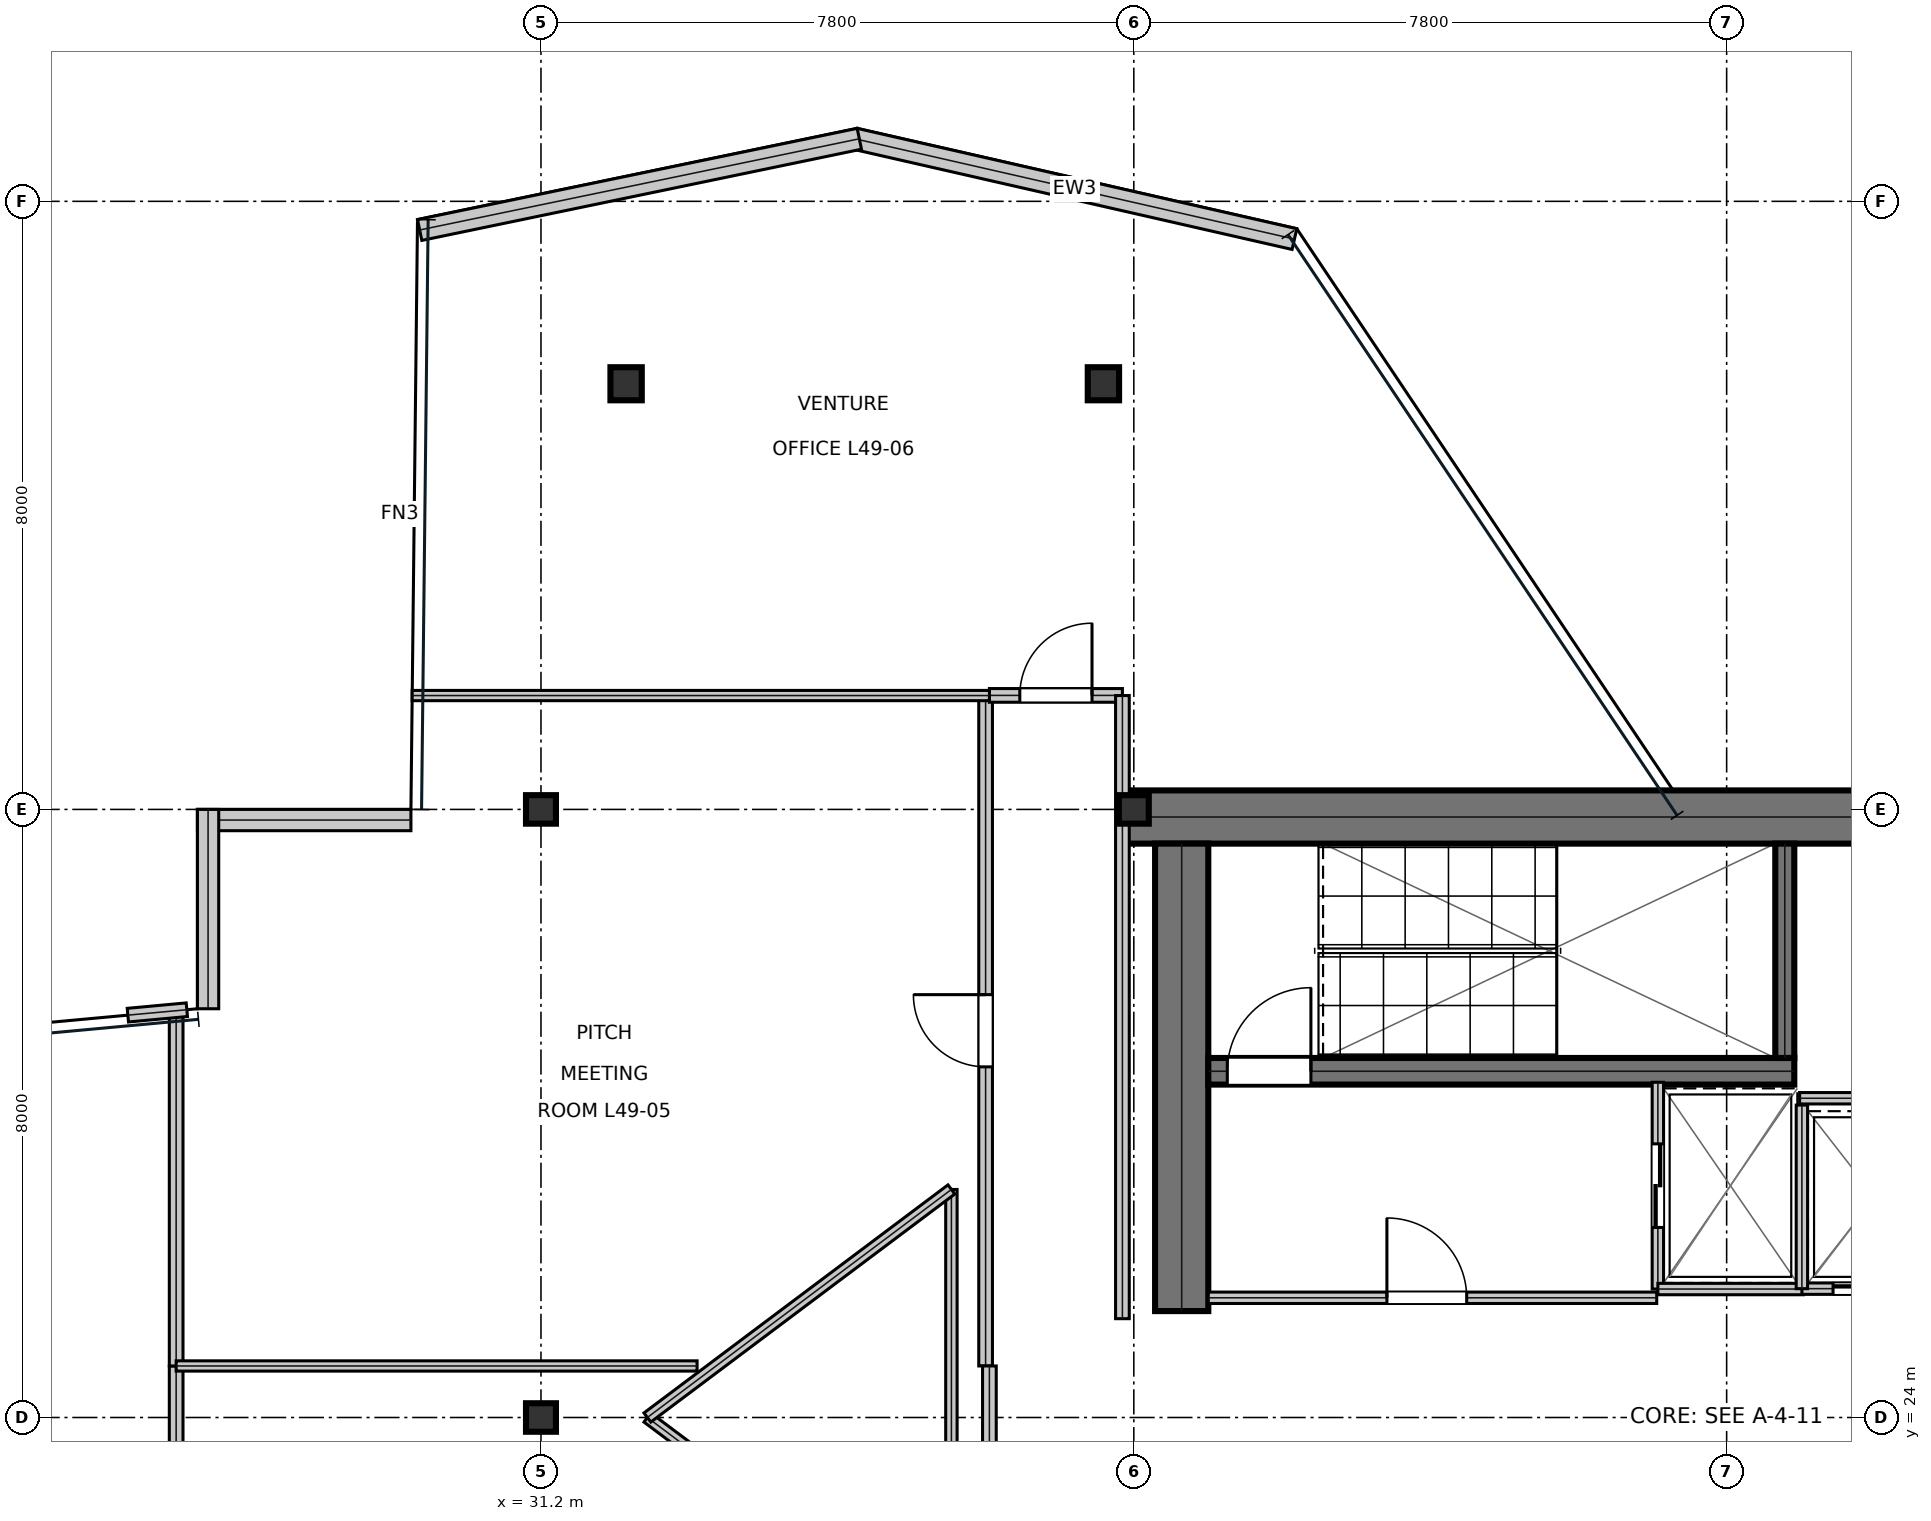
"""IFC4 building model, lengths in metres.
Left out: names, types, materials, properties, quantities, classifications, styles, units other than length and angle.
Written with IfcOpenShell. Run it as: python <this file> out.ifc"""

import sys

from ifc_helpers import new_model, si_unit, direction, frame, frame_2d, origin, origin_2d, place, context, subcontext, project, spatial, rectangle, i_section, extrude, element, fill, save


model = new_model("IFC4")
c1 = context("Model", 3, precision=1e-05, world=origin(), true_north=direction((0.0, 1.0)))
c2 = subcontext(c1, "Body", "Model", "MODEL_VIEW")
j1 = project(units=[si_unit("LENGTHUNIT", "METRE"), si_unit("PLANEANGLEUNIT", "RADIAN")], contexts=[c1])
p1 = place(None, origin())
s1 = spatial("IfcSite", under=j1, at=p1, CompositionType="ELEMENT")
p2 = place(p1, origin())
s2 = spatial("IfcBuilding", under=s1, at=p2, CompositionType="ELEMENT")
p3 = place(p2, frame((0.0, 0.0, 212.1)))
s3 = spatial("IfcBuildingStorey", under=s2, at=p3, CompositionType="ELEMENT", Elevation=212.1)
p4 = place(p3, frame((38.8, 31.9, 0.0), z_axis=(0.0, 0.0, 1.0), x_axis=(1.0, 0.0, 0.0)))
e1 = element("IfcWall", 1, at=p4, inside=s3, PredefinedType="SHEAR", context=c2, shape_type="SweptSolid", body=[
    extrude(rectangle(XDim=16.0, YDim=0.7, at=frame_2d((8.0, 0.0))), origin(), (0.0, 0.0, 1.0), 3.79),
])
p5 = place(p3, frame((39.63, 25.4, 0.0), z_axis=(0.0, 0.0, 1.0), x_axis=(0.0, 1.0, 0.0)))
e2 = element("IfcWall", 2, at=p5, inside=s3, PredefinedType="SHEAR", context=c2, shape_type="SweptSolid", body=[
    extrude(rectangle(XDim=6.15, YDim=0.7, at=frame_2d((3.075, 0.0))), origin(), (0.0, 0.0, 1.0), 3.79),
])
p6 = place(p3, frame((39.98, 28.555, 0.0), z_axis=(0.0, 0.0, 1.0), x_axis=(1.0, 0.0, 0.0)))
e3 = element("IfcWall", 3, at=p6, inside=s3, PredefinedType="SHEAR", context=c2, shape_type="SweptSolid", body=[
    extrude(rectangle(XDim=7.71, YDim=0.35, at=frame_2d((3.855, 0.0))), origin(), (0.0, 0.0, 1.0), 3.79),
])
p7 = place(p6, frame((0.25, 0.0, 0.0)))
e4 = element("IfcOpeningElement", 4, at=p7, cuts=e3, PredefinedType="OPENING", context=c2, shape_type="SweptSolid", body=[
    extrude(rectangle(XDim=1.1, YDim=2.15, at=frame_2d((0.55, 1.075))), frame((0.0, 0.185, 0.0), z_axis=(0.0, -1.0, 0.0), x_axis=(1.0, 0.0, 0.0)), (0.0, 0.0, 1.0), 0.37),
])
p8 = place(p3, frame((47.565, 28.73, 0.0), z_axis=(0.0, 0.0, 1.0), x_axis=(0.0, 1.0, 0.0)))
e5 = element("IfcWall", 5, at=p8, inside=s3, PredefinedType="SHEAR", context=c2, shape_type="SweptSolid", body=[
    extrude(rectangle(XDim=2.82, YDim=0.25, at=frame_2d((1.41, 0.0))), origin(), (0.0, 0.0, 1.0), 3.79),
])
for number, where, z_axis, x_axis in (
    (6, (31.2, 24.0, 0.0), (0.0, 0.0, 1.0), (1.0, 0.0, 0.0)),
    (7, (31.2, 32.0, 0.0), (0.0, 0.0, 1.0), (1.0, 0.0, 0.0)),
    (8, (39.0, 32.0, 0.0), (0.0, 0.0, 1.0), (1.0, 0.0, 0.0)),
):
    element("IfcColumn", number, at=place(p3, frame(where, z_axis=z_axis, x_axis=x_axis)), inside=s3, PredefinedType="COLUMN", context=c2, shape_type="SweptSolid", body=[
        extrude(i_section(OverallWidth=0.394, OverallDepth=0.375, WebThickness=0.017, FlangeThickness=0.028, at=origin_2d()), origin(), (0.0, 0.0, 1.0), 4.044),
    ])
p9 = place(p3, frame((32.32, 37.6, 0.016), z_axis=(0.017362829439, -0.037336154213, 0.999151912245), x_axis=(0.906747333095, 0.421674369537, 0.0)))
e9 = element("IfcColumn", 9, at=p9, inside=s3, PredefinedType="COLUMN", context=c2, shape_type="SweptSolid", body=[
    extrude(i_section(OverallWidth=0.412, OverallDepth=0.435, WebThickness=0.036, FlangeThickness=0.058, at=origin_2d()), origin(), (0.0, 0.0, 1.0), 4.021),
])
p10 = place(p3, frame((38.6, 37.6, 0.016), z_axis=(-0.006253867425, -0.037341053069, 0.999283010412), x_axis=(0.986263587143, -0.165179104839, 0.0)))
e10 = element("IfcColumn", 10, at=p10, inside=s3, PredefinedType="COLUMN", context=c2, shape_type="SweptSolid", body=[
    extrude(i_section(OverallWidth=0.412, OverallDepth=0.435, WebThickness=0.036, FlangeThickness=0.058, at=origin_2d()), origin(), (0.0, 0.0, 1.0), 4.021),
])
p11 = place(p3, frame((41.113, 39.503, 0.0), z_axis=(0.0, 0.0, 1.0), x_axis=(-0.974934808954, 0.222490715064, 0.0)))
e11 = element("IfcWall", 11, at=p11, inside=s3, PredefinedType="STANDARD", context=c2, shape_type="SweptSolid", body=[
    extrude(rectangle(XDim=5.933, YDim=0.28, at=frame_2d((2.967, 0.0))), origin(), (0.0, 0.0, 1.0), 3.79),
])
p12 = place(p3, frame((35.388, 40.823, 0.0), z_axis=(0.0, 0.0, 1.0), x_axis=(-0.979145472124, -0.203160390873, 0.0)))
e12 = element("IfcWall", 12, at=p12, inside=s3, PredefinedType="STANDARD", context=c2, shape_type="SweptSolid", body=[
    extrude(rectangle(XDim=5.908, YDim=0.28, at=frame_2d((2.954, 0.0))), origin(), (0.0, 0.0, 1.0), 3.79),
])
p13 = place(p3, frame((29.489, 31.86, 0.0), z_axis=(0.0, 0.0, 1.0), x_axis=(-1.0, 0.0, 0.0)))
e13 = element("IfcWall", 13, at=p13, inside=s3, PredefinedType="STANDARD", context=c2, shape_type="SweptSolid", body=[
    extrude(rectangle(XDim=2.809, YDim=0.28, at=frame_2d((1.405, 0.0))), origin(), (0.0, 0.0, 1.0), 3.79),
])
p14 = place(p3, frame((26.82, 32.0, 0.0), z_axis=(0.0, 0.0, 1.0), x_axis=(0.0, -1.0, 0.0)))
e14 = element("IfcWall", 14, at=p14, inside=s3, PredefinedType="STANDARD", context=c2, shape_type="SweptSolid", body=[
    extrude(rectangle(XDim=2.622, YDim=0.28, at=frame_2d((1.311, 0.0))), origin(), (0.0, 0.0, 1.0), 3.319),
])
p15 = place(p3, frame((39.98, 25.575, 0.0), z_axis=(0.0, 0.0, 1.0), x_axis=(1.0, 0.0, 0.0)))
e15 = element("IfcWall", 15, at=p15, inside=s3, PredefinedType="PARTITIONING", context=c2, shape_type="SweptSolid", body=[
    extrude(rectangle(XDim=5.9, YDim=0.15, at=frame_2d((2.95, 0.0))), origin(), (0.0, 0.0, 1.0), 3.79),
])
p16 = place(p15, frame((2.35, 0.0, 0.0)))
e16 = element("IfcOpeningElement", 16, at=p16, cuts=e15, PredefinedType="OPENING", context=c2, shape_type="SweptSolid", body=[
    extrude(rectangle(XDim=1.05, YDim=2.15, at=frame_2d((0.525, 1.075))), frame((0.0, 0.085, 0.0), z_axis=(0.0, -1.0, 0.0), x_axis=(1.0, 0.0, 0.0)), (0.0, 0.0, 1.0), 0.17),
])
p17 = place(p3, frame((45.895, 25.69, 0.0), z_axis=(0.0, 0.0, 1.0), x_axis=(0.0, 1.0, 0.0)))
e17 = element("IfcWall", 17, at=p17, inside=s3, PredefinedType="PARTITIONING", context=c2, shape_type="SweptSolid", body=[
    extrude(rectangle(XDim=2.72, YDim=0.15, at=frame_2d((1.36, 0.0))), origin(), (0.0, 0.0, 1.0), 3.79),
])
p18 = place(p17, frame((0.81, 0.0, 0.0)))
e18 = element("IfcOpeningElement", 18, at=p18, cuts=e17, PredefinedType="OPENING", context=c2, shape_type="SweptSolid", body=[
    extrude(rectangle(XDim=1.1, YDim=2.15, at=frame_2d((0.55, 1.075))), frame((0.0, 0.085, 0.0), z_axis=(0.0, -1.0, 0.0), x_axis=(1.0, 0.0, 0.0)), (0.0, 0.0, 1.0), 0.17),
])
p19 = place(p3, frame((45.895, 25.69, 0.0), z_axis=(0.0, 0.0, 1.0), x_axis=(1.0, 0.0, 0.0)))
e19 = element("IfcWall", 19, at=p19, inside=s3, PredefinedType="PARTITIONING", context=c2, shape_type="SweptSolid", body=[
    extrude(rectangle(XDim=1.915, YDim=0.15, at=frame_2d((0.958, 0.0))), origin(), (0.0, 0.0, 1.0), 3.79),
])
p20 = place(p3, frame((47.79, 25.695, 0.0), z_axis=(0.0, 0.0, 1.0), x_axis=(1.0, 0.0, 0.0)))
e20 = element("IfcWall", 20, at=p20, inside=s3, PredefinedType="PARTITIONING", context=c2, shape_type="SweptSolid", body=[
    extrude(rectangle(XDim=1.92, YDim=0.15, at=frame_2d((0.96, 0.0))), origin(), (0.0, 0.0, 1.0), 3.79),
])
p21 = place(p20, frame((0.41, 0.0, 0.0)))
e21 = element("IfcOpeningElement", 21, at=p21, cuts=e20, PredefinedType="OPENING", context=c2, shape_type="SweptSolid", body=[
    extrude(rectangle(XDim=1.1, YDim=2.15, at=frame_2d((0.55, 1.075))), frame((0.0, 0.085, 0.0), z_axis=(0.0, -1.0, 0.0), x_axis=(1.0, 0.0, 0.0)), (0.0, 0.0, 1.0), 0.17),
])
p22 = place(p3, frame((47.79, 25.695, 0.0), z_axis=(0.0, 0.0, 1.0), x_axis=(0.0, 1.0, 0.0)))
e22 = element("IfcWall", 22, at=p22, inside=s3, PredefinedType="PARTITIONING", context=c2, shape_type="SweptSolid", body=[
    extrude(rectangle(XDim=2.415, YDim=0.15, at=frame_2d((1.208, 0.0))), origin(), (0.0, 0.0, 1.0), 3.79),
])
p23 = place(p3, frame((47.76, 28.2, 0.0), z_axis=(0.0, 0.0, 1.0), x_axis=(1.0, 0.0, 0.0)))
e23 = element("IfcWall", 23, at=p23, inside=s3, PredefinedType="PARTITIONING", context=c2, shape_type="SweptSolid", body=[
    extrude(rectangle(XDim=2.04, YDim=0.15, at=frame_2d((1.02, 0.0))), origin(), (0.0, 0.0, 1.0), 3.79),
])
p24 = place(p3, frame((37.05, 24.678, 0.0), z_axis=(0.0, 0.0, 1.0), x_axis=(0.0, 1.0, 0.0)))
e24 = element("IfcWall", 24, at=p24, inside=s3, PredefinedType="SOLIDWALL", context=c2, shape_type="SweptSolid", body=[
    extrude(rectangle(XDim=8.82, YDim=0.18, at=frame_2d((4.41, 0.0))), origin(), (0.0, 0.0, 1.0), 3.241),
])
p25 = place(p24, frame((3.935, 0.0, 0.0)))
e25 = element("IfcOpeningElement", 25, at=p25, cuts=e24, PredefinedType="OPENING", context=c2, shape_type="SweptSolid", body=[
    extrude(rectangle(XDim=0.95, YDim=2.15, at=frame_2d((0.475, 1.075))), frame((0.0, 0.1, 0.0), z_axis=(0.0, -1.0, 0.0), x_axis=(1.0, 0.0, 0.0)), (0.0, 0.0, 1.0), 0.2),
])
p26 = place(p3, frame((37.1, 33.5, 0.0), z_axis=(0.0, 0.0, 1.0), x_axis=(1.0, 0.0, 0.0)))
e26 = element("IfcWall", 26, at=p26, inside=s3, PredefinedType="SOLIDWALL", context=c2, shape_type="SweptSolid", body=[
    extrude(rectangle(XDim=1.75, YDim=0.18, at=frame_2d((0.875, 0.0))), origin(), (0.0, 0.0, 1.0), 3.241),
])
p27 = place(p26, frame((0.4, 0.0, 0.0)))
e27 = element("IfcOpeningElement", 27, at=p27, cuts=e26, PredefinedType="OPENING", context=c2, shape_type="SweptSolid", body=[
    extrude(rectangle(XDim=0.95, YDim=2.15, at=frame_2d((0.475, 1.075))), frame((0.0, 0.1, 0.0), z_axis=(0.0, -1.0, 0.0), x_axis=(1.0, 0.0, 0.0)), (0.0, 0.0, 1.0), 0.2),
])
p28 = place(p3, frame((26.4, 20.6, 0.0), z_axis=(0.0, 0.0, 1.0), x_axis=(0.0, 1.0, 0.0)))
e28 = element("IfcWall", 28, at=p28, inside=s3, PredefinedType="SOLIDWALL", context=c2, shape_type="SweptSolid", body=[
    extrude(rectangle(XDim=4.078, YDim=0.18, at=frame_2d((2.039, 0.0))), origin(), (0.0, 0.0, 1.0), 3.241),
])
p29 = place(p3, frame((37.1, 20.6, 0.0), z_axis=(0.0, 0.0, 1.0), x_axis=(0.0, 1.0, 0.0)))
e29 = element("IfcWall", 29, at=p29, inside=s3, PredefinedType="SOLIDWALL", context=c2, shape_type="SweptSolid", body=[
    extrude(rectangle(XDim=4.078, YDim=0.18, at=frame_2d((2.039, 0.0))), origin(), (0.0, 0.0, 1.0), 3.79),
])
p30 = place(p3, frame((26.4, 24.678, 0.0), z_axis=(0.0, 0.0, 1.0), x_axis=(0.0, 1.0, 0.0)))
e30 = element("IfcWall", 30, at=p30, inside=s3, PredefinedType="SOLIDWALL", context=c2, shape_type="SweptSolid", body=[
    extrude(rectangle(XDim=4.674, YDim=0.18, at=frame_2d((2.337, 0.0))), origin(), (0.0, 0.0, 1.0), 3.241),
])
p31 = place(p3, frame((25.765, 29.293, 0.0), z_axis=(0.0, 0.0, 1.0), x_axis=(0.995774178655, 0.091835641909, 0.0)))
e31 = element("IfcWall", 31, at=p31, inside=s3, PredefinedType="SOLIDWALL", context=c2, shape_type="SweptSolid", body=[
    extrude(rectangle(XDim=0.779, YDim=0.18, at=frame_2d((0.389, 0.0))), origin(), (0.0, 0.0, 1.0), 3.79),
])
p32 = place(p3, frame((38.85, 25.3, 0.0), z_axis=(0.0, 0.0, 1.0), x_axis=(0.0, 1.0, 0.0)))
e32 = element("IfcWall", 32, at=p32, inside=s3, PredefinedType="SOLIDWALL", context=c2, shape_type="SweptSolid", body=[
    extrude(rectangle(XDim=8.198, YDim=0.18, at=frame_2d((4.099, 0.0))), origin(), (0.0, 0.0, 1.0), 3.241),
])
p33 = place(p3, frame((26.4, 24.678, 0.0), z_axis=(0.0, 0.0, 1.0), x_axis=(1.0, 0.0, 0.0)))
e33 = element("IfcWall", 33, at=p33, inside=s3, PredefinedType="PARTITIONING", context=c2, shape_type="SweptSolid", body=[
    extrude(rectangle(XDim=6.854, YDim=0.135, at=frame_2d((3.427, 0.0))), origin(), (0.0, 0.0, 1.0), 3.241),
])
p34 = place(p3, frame((29.506, 33.498, 0.0), z_axis=(0.0, 0.0, 1.0), x_axis=(1.0, 0.0, 0.0)))
e34 = element("IfcWall", 34, at=p34, inside=s3, PredefinedType="PARTITIONING", context=c2, shape_type="SweptSolid", body=[
    extrude(rectangle(XDim=7.594, YDim=0.135, at=frame_2d((3.797, 0.0))), origin(), (0.0, 0.0, 1.0), 3.319),
])
p35 = place(p3, frame((32.6, 24.0, 0.0), z_axis=(0.0, 0.0, 1.0), x_axis=(0.8, -0.6, 0.0)))
e35 = element("IfcWall", 35, at=p35, inside=s3, PredefinedType="MOVABLE", context=c2, shape_type="SweptSolid", body=[
    extrude(rectangle(XDim=5.0, YDim=0.15, at=frame_2d((2.5, 0.0))), origin(), (0.0, 0.0, 1.0), 3.79),
])
p36 = place(p3, frame((36.6, 21.0, 0.0), z_axis=(0.0, 0.0, 1.0), x_axis=(0.0, 1.0, 0.0)))
e36 = element("IfcWall", 36, at=p36, inside=s3, PredefinedType="MOVABLE", context=c2, shape_type="SweptSolid", body=[
    extrude(rectangle(XDim=6.0, YDim=0.15, at=frame_2d((3.0, 0.0))), origin(), (0.0, 0.0, 1.0), 3.79),
])
p37 = place(p3, frame((36.6, 27.0, 0.0), z_axis=(0.0, 0.0, 1.0), x_axis=(-0.8, -0.6, 0.0)))
e37 = element("IfcWall", 37, at=p37, inside=s3, PredefinedType="MOVABLE", context=c2, shape_type="SweptSolid", body=[
    extrude(rectangle(XDim=5.0, YDim=0.15, at=frame_2d((2.5, 0.0))), origin(), (0.0, 0.0, 1.0), 3.79),
])
p38 = place(p16, origin())
e38 = element("IfcDoor", 38, at=p38, inside=s3, OperationType="SINGLE_SWING_LEFT", PredefinedType="DOOR", context=c2, shape_type="SweptSolid", body=[
    extrude(rectangle(XDim=1.05, YDim=2.15, at=frame_2d((0.525, 1.075))), frame((0.0, 0.025, 0.0), z_axis=(0.0, -1.0, 0.0), x_axis=(1.0, 0.0, 0.0)), (0.0, 0.0, 1.0), 0.05),
])
fill(e16, e38)
p39 = place(p18, frame((1.1, 0.0, 0.0), z_axis=(0.0, 0.0, 1.0), x_axis=(-1.0, 0.0, 0.0)))
e39 = element("IfcDoor", 39, at=p39, inside=s3, OperationType="DOUBLE_DOOR_SLIDING", PredefinedType="DOOR", context=c2, shape_type="SweptSolid", body=[
    extrude(rectangle(XDim=1.1, YDim=2.15, at=frame_2d((0.55, 1.075))), frame((0.0, 0.025, 0.0), z_axis=(0.0, -1.0, 0.0), x_axis=(1.0, 0.0, 0.0)), (0.0, 0.0, 1.0), 0.05),
])
fill(e18, e39)
p40 = place(p21, frame((1.1, 0.0, 0.0), z_axis=(0.0, 0.0, 1.0), x_axis=(-1.0, 0.0, 0.0)))
e40 = element("IfcDoor", 40, at=p40, inside=s3, OperationType="DOUBLE_DOOR_SLIDING", PredefinedType="DOOR", context=c2, shape_type="SweptSolid", body=[
    extrude(rectangle(XDim=1.1, YDim=2.15, at=frame_2d((0.55, 1.075))), frame((0.0, 0.025, 0.0), z_axis=(0.0, -1.0, 0.0), x_axis=(1.0, 0.0, 0.0)), (0.0, 0.0, 1.0), 0.05),
])
fill(e21, e40)
p41 = place(p25, origin())
e41 = element("IfcDoor", 41, at=p41, inside=s3, OperationType="SINGLE_SWING_RIGHT", PredefinedType="DOOR", context=c2, shape_type="SweptSolid", body=[
    extrude(rectangle(XDim=0.95, YDim=2.15, at=frame_2d((0.475, 1.075))), frame((0.0, 0.025, 0.0), z_axis=(0.0, -1.0, 0.0), x_axis=(1.0, 0.0, 0.0)), (0.0, 0.0, 1.0), 0.05),
])
fill(e25, e41)
p42 = place(p27, origin())
e42 = element("IfcDoor", 42, at=p42, inside=s3, OperationType="SINGLE_SWING_RIGHT", PredefinedType="DOOR", context=c2, shape_type="SweptSolid", body=[
    extrude(rectangle(XDim=0.95, YDim=2.15, at=frame_2d((0.475, 1.075))), frame((0.0, 0.025, 0.0), z_axis=(0.0, -1.0, 0.0), x_axis=(1.0, 0.0, 0.0)), (0.0, 0.0, 1.0), 0.05),
])
fill(e27, e42)
p43 = place(p7, origin())
e43 = element("IfcDoor", 43, at=p43, inside=s3, OperationType="SINGLE_SWING_RIGHT", PredefinedType="DOOR", context=c2, shape_type="SweptSolid", body=[
    extrude(rectangle(XDim=1.1, YDim=2.15, at=frame_2d((0.55, 1.075))), frame((0.0, 0.025, 0.0), z_axis=(0.0, -1.0, 0.0), x_axis=(1.0, 0.0, 0.0)), (0.0, 0.0, 1.0), 0.05),
])
fill(e4, e43)
save(model, sys.argv[1])
